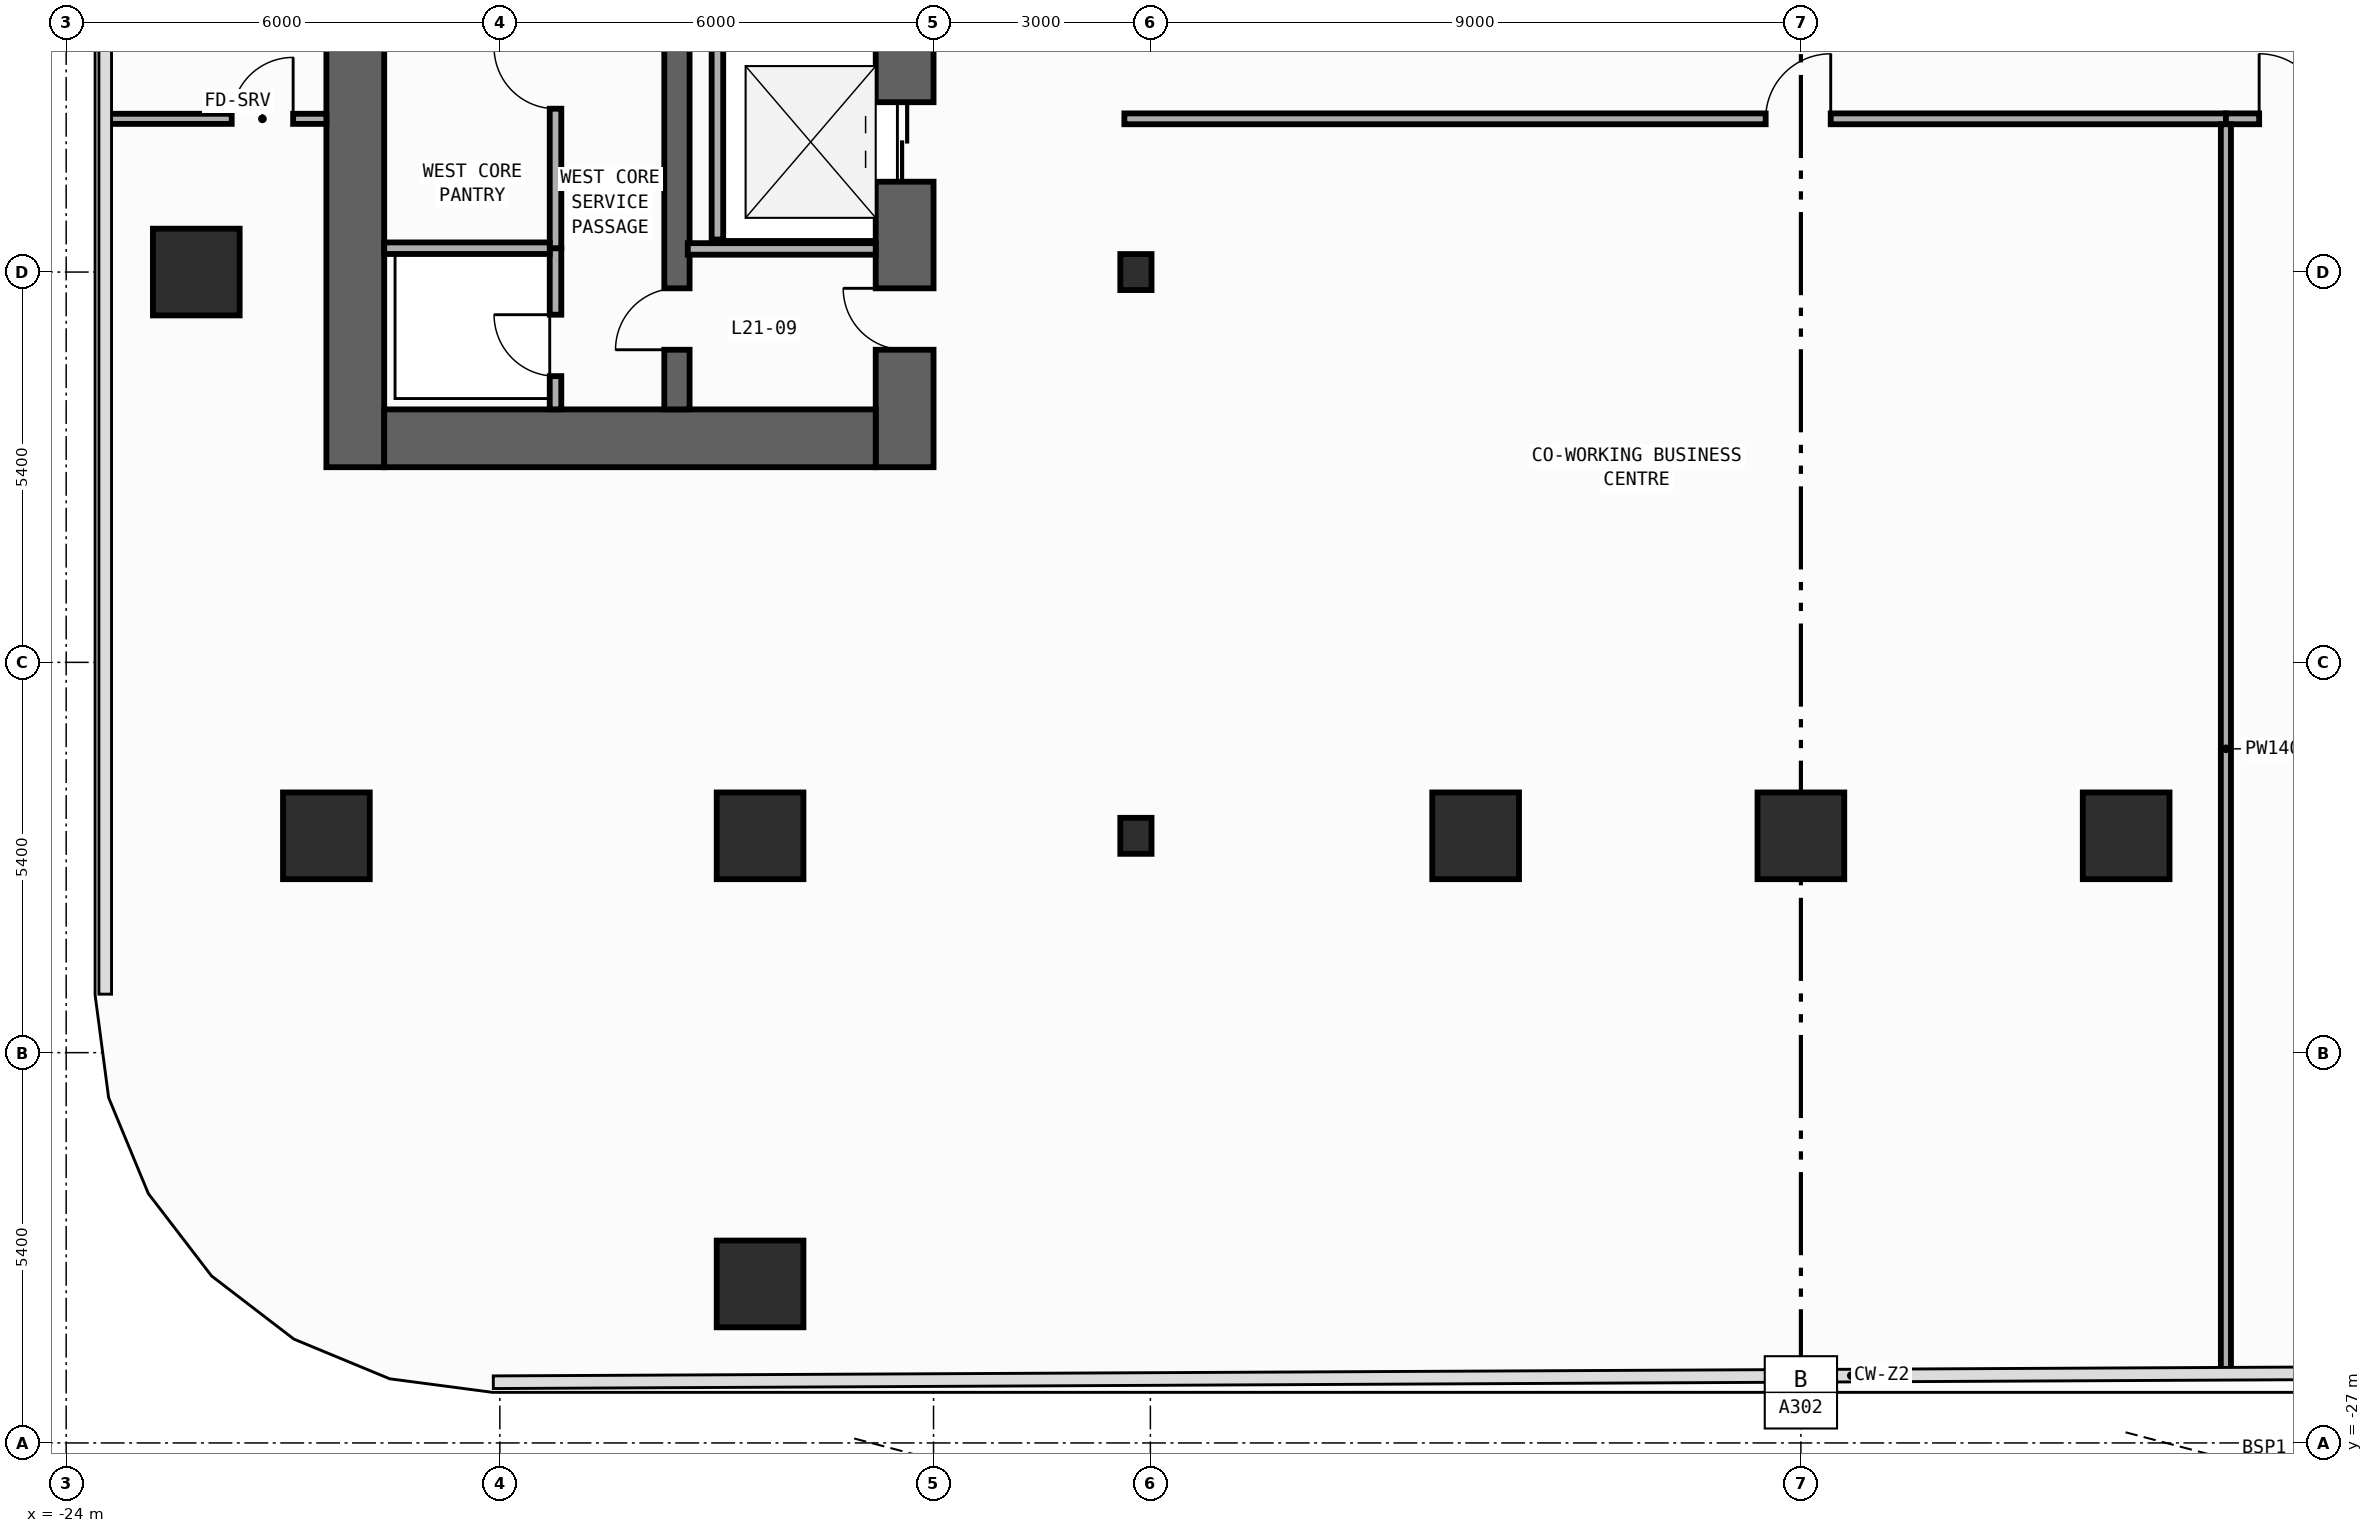
"""IFC4 building model, lengths in metres.
Left out: names, types, materials, properties, quantities, classifications, styles, units other than length and angle.
Written with IfcOpenShell. Run it as: python <this file> out.ifc"""

import sys

from ifc_helpers import new_model, si_unit, direction, frame, frame_2d, origin, origin_2d, place, context, subcontext, project, spatial, rectangle, i_section, extrude, element, fill, save


model = new_model("IFC4")
c1 = context("Model", 3, precision=1e-05, world=origin(), true_north=direction((0.0, 1.0)))
c2 = subcontext(c1, "Body", "Model", "MODEL_VIEW")
j1 = project(units=[si_unit("LENGTHUNIT", "METRE"), si_unit("PLANEANGLEUNIT", "RADIAN")], contexts=[c1])
p1 = place(None, origin())
s1 = spatial("IfcSite", under=j1, at=p1, CompositionType="ELEMENT")
p2 = place(p1, origin())
s2 = spatial("IfcBuilding", under=s1, at=p2, CompositionType="ELEMENT")
p3 = place(p2, frame((0.0, 0.0, 93.2)))
s3 = spatial("IfcBuildingStorey", under=s2, at=p3, CompositionType="ELEMENT", Elevation=93.2)
p4 = place(p3, frame((-20.0, -13.5, 0.0), z_axis=(0.0, 0.0, 1.0), x_axis=(0.0, 1.0, 0.0)))
e1 = element("IfcWall", 1, at=p4, inside=s3, PredefinedType="SHEAR", context=c2, shape_type="SweptSolid", body=[
    extrude(rectangle(XDim=27.0, YDim=0.8, at=frame_2d((13.5, 0.0))), origin(), (0.0, 0.0, 1.0), 3.94),
])
p5 = place(p3, frame((-12.4, -13.5, 0.0), z_axis=(0.0, 0.0, 1.0), x_axis=(0.0, 1.0, 0.0)))
e2 = element("IfcWall", 2, at=p5, inside=s3, PredefinedType="SHEAR", context=c2, shape_type="SweptSolid", body=[
    extrude(rectangle(XDim=27.0, YDim=0.8, at=frame_2d((13.5, 0.0))), origin(), (0.0, 0.0, 1.0), 3.94),
])
p6 = place(p5, frame((21.55, 0.0, 0.0)))
e3 = element("IfcOpeningElement", 3, at=p6, cuts=e2, PredefinedType="OPENING", context=c2, shape_type="SweptSolid", body=[
    extrude(rectangle(XDim=1.1, YDim=2.2, at=frame_2d((0.55, 1.1))), frame((0.0, 0.41, 0.0), z_axis=(0.0, -1.0, 0.0), x_axis=(1.0, 0.0, 0.0)), (0.0, 0.0, 1.0), 0.82),
])
p7 = place(p5, frame((18.35, 0.0, 0.0)))
e4 = element("IfcOpeningElement", 4, at=p7, cuts=e2, PredefinedType="OPENING", context=c2, shape_type="SweptSolid", body=[
    extrude(rectangle(XDim=1.1, YDim=2.2, at=frame_2d((0.55, 1.1))), frame((0.0, 0.41, 0.0), z_axis=(0.0, -1.0, 0.0), x_axis=(1.0, 0.0, 0.0)), (0.0, 0.0, 1.0), 0.82),
])
p8 = place(p5, frame((15.15, 0.0, 0.0)))
e5 = element("IfcOpeningElement", 5, at=p8, cuts=e2, PredefinedType="OPENING", context=c2, shape_type="SweptSolid", body=[
    extrude(rectangle(XDim=1.1, YDim=2.2, at=frame_2d((0.55, 1.1))), frame((0.0, 0.41, 0.0), z_axis=(0.0, -1.0, 0.0), x_axis=(1.0, 0.0, 0.0)), (0.0, 0.0, 1.0), 0.82),
])
p9 = place(p5, frame((10.35, 0.0, 0.0)))
e6 = element("IfcOpeningElement", 6, at=p9, cuts=e2, PredefinedType="OPENING", context=c2, shape_type="SweptSolid", body=[
    extrude(rectangle(XDim=1.1, YDim=2.2, at=frame_2d((0.55, 1.1))), frame((0.0, 0.41, 0.0), z_axis=(0.0, -1.0, 0.0), x_axis=(1.0, 0.0, 0.0)), (0.0, 0.0, 1.0), 0.82),
])
p10 = place(p5, frame((7.15, 0.0, 0.0)))
e7 = element("IfcOpeningElement", 7, at=p10, cuts=e2, PredefinedType="OPENING", context=c2, shape_type="SweptSolid", body=[
    extrude(rectangle(XDim=1.1, YDim=2.2, at=frame_2d((0.55, 1.1))), frame((0.0, 0.41, 0.0), z_axis=(0.0, -1.0, 0.0), x_axis=(1.0, 0.0, 0.0)), (0.0, 0.0, 1.0), 0.82),
])
p11 = place(p5, frame((3.95, 0.0, 0.0)))
e8 = element("IfcOpeningElement", 8, at=p11, cuts=e2, PredefinedType="OPENING", context=c2, shape_type="SweptSolid", body=[
    extrude(rectangle(XDim=1.1, YDim=2.2, at=frame_2d((0.55, 1.1))), frame((0.0, 0.41, 0.0), z_axis=(0.0, -1.0, 0.0), x_axis=(1.0, 0.0, 0.0)), (0.0, 0.0, 1.0), 0.82),
])
p12 = place(p5, frame((12.725, 0.0, 0.0)))
e9 = element("IfcOpeningElement", 9, at=p12, cuts=e2, PredefinedType="OPENING", context=c2, shape_type="SweptSolid", body=[
    extrude(rectangle(XDim=1.15, YDim=2.2, at=frame_2d((0.575, 1.1))), frame((0.0, 0.41, 0.0), z_axis=(0.0, -1.0, 0.0), x_axis=(1.0, 0.0, 0.0)), (0.0, 0.0, 1.0), 0.82),
])
p13 = place(p5, frame((1.625, 0.0, 0.0)))
e10 = element("IfcOpeningElement", 10, at=p13, cuts=e2, PredefinedType="OPENING", context=c2, shape_type="SweptSolid", body=[
    extrude(rectangle(XDim=0.85, YDim=2.1, at=frame_2d((0.425, 1.05))), frame((0.0, 0.41, 0.0), z_axis=(0.0, -1.0, 0.0), x_axis=(1.0, 0.0, 0.0)), (0.0, 0.0, 1.0), 0.82),
])
p14 = place(p3, frame((-19.6, -13.1, 0.0), z_axis=(0.0, 0.0, 1.0), x_axis=(1.0, 0.0, 0.0)))
e11 = element("IfcWall", 11, at=p14, inside=s3, PredefinedType="SHEAR", context=c2, shape_type="SweptSolid", body=[
    extrude(rectangle(XDim=6.8, YDim=0.8, at=frame_2d((3.4, 0.0))), origin(), (0.0, 0.0, 1.0), 3.94),
])
p15 = place(p3, frame((-15.55, -12.7, 0.0), z_axis=(0.0, 0.0, 1.0), x_axis=(0.0, 1.0, 0.0)))
e12 = element("IfcWall", 12, at=p15, inside=s3, PredefinedType="SHEAR", context=c2, shape_type="SweptSolid", body=[
    extrude(rectangle(XDim=25.4, YDim=0.35, at=frame_2d((12.7, 0.0))), origin(), (0.0, 0.0, 1.0), 3.94),
])
p16 = place(p15, frame((11.925, 0.0, 0.0)))
e13 = element("IfcOpeningElement", 13, at=p16, cuts=e12, PredefinedType="OPENING", context=c2, shape_type="SweptSolid", body=[
    extrude(rectangle(XDim=1.15, YDim=2.2, at=frame_2d((0.575, 1.1))), frame((0.0, 0.185, 0.0), z_axis=(0.0, -1.0, 0.0), x_axis=(1.0, 0.0, 0.0)), (0.0, 0.0, 1.0), 0.37),
])
p17 = place(p15, frame((0.825, 0.0, 0.0)))
e14 = element("IfcOpeningElement", 14, at=p17, cuts=e12, PredefinedType="OPENING", context=c2, shape_type="SweptSolid", body=[
    extrude(rectangle(XDim=0.85, YDim=2.1, at=frame_2d((0.425, 1.05))), frame((0.0, 0.185, 0.0), z_axis=(0.0, -1.0, 0.0), x_axis=(1.0, 0.0, 0.0)), (0.0, 0.0, 1.0), 0.37),
])
for number, where, z_axis, x_axis in (
    (15, (-9.2, -18.6, 0.0), (0.0, 0.0, 1.0), (1.0, 0.0, 0.0)),
    (16, (-9.2, -10.8, 0.0), (0.0, 0.0, 1.0), (1.0, 0.0, 0.0)),
):
    element("IfcColumn", number, at=place(p3, frame(where, z_axis=z_axis, x_axis=x_axis)), inside=s3, PredefinedType="COLUMN", context=c2, shape_type="SweptSolid", body=[
        extrude(i_section(OverallWidth=0.432, OverallDepth=0.498, WebThickness=0.045, FlangeThickness=0.07, FilletRadius=0.022, at=origin_2d()), origin(), (0.0, 0.0, 1.0), 4.2),
    ])
for number, where, z_axis, x_axis in (
    (17, (-20.4, -18.6, 0.0), (0.0, 0.0, 1.0), (1.0, 0.0, 0.0)),
    (18, (-14.4, -18.6, 0.0), (0.0, 0.0, 1.0), (1.0, 0.0, 0.0)),
    (19, (-4.5, -18.6, 0.0), (0.0, 0.0, 1.0), (1.0, 0.0, 0.0)),
    (20, (0.0, -18.6, 0.0), (0.0, 0.0, 1.0), (1.0, 0.0, 0.0)),
    (21, (4.5, -18.6, 0.0), (0.0, 0.0, 1.0), (1.0, 0.0, 0.0)),
    (22, (-22.2, -10.8, 0.0), (0.0, 0.0, 1.0), (1.0, 0.0, 0.0)),
    (23, (-14.4, -24.8, 0.0), (0.0, 0.0, 1.0), (1.0, 0.0, 0.0)),
):
    element("IfcColumn", number, at=place(p3, frame(where, z_axis=z_axis, x_axis=x_axis)), inside=s3, PredefinedType="COLUMN", context=c2, shape_type="SweptSolid", body=[
        extrude(rectangle(XDim=1.2, YDim=1.2, at=origin_2d()), origin(), (0.0, 0.0, 1.0), 4.2),
    ])
p18 = place(p3, frame((-14.99, -10.35, 0.0), z_axis=(0.0, 0.0, 1.0), x_axis=(0.0, 1.0, 0.0)))
e24 = element("IfcWall", 24, at=p18, inside=s3, PredefinedType="STANDARD", context=c2, shape_type="SweptSolid", body=[
    extrude(rectangle(XDim=2.7, YDim=0.16, at=frame_2d((1.35, 0.0))), origin(), (0.0, 0.0, 1.0), 3.94),
])
p19 = place(p3, frame((-15.4, -10.48, 0.0), z_axis=(0.0, 0.0, 1.0), x_axis=(1.0, 0.0, 0.0)))
e25 = element("IfcWall", 25, at=p19, inside=s3, PredefinedType="STANDARD", context=c2, shape_type="SweptSolid", body=[
    extrude(rectangle(XDim=2.6, YDim=0.16, at=frame_2d((1.3, 0.0))), origin(), (0.0, 0.0, 1.0), 3.94),
])
p20 = place(p3, frame((-17.23, -12.7, 0.0), z_axis=(0.0, 0.0, 1.0), x_axis=(0.0, 1.0, 0.0)))
e26 = element("IfcWall", 26, at=p20, inside=s3, PredefinedType="PARTITIONING", context=c2, shape_type="SweptSolid", body=[
    extrude(rectangle(XDim=2.23, YDim=0.16, at=frame_2d((1.115, 0.0))), origin(), (0.0, 0.0, 1.0), 3.94),
])
p21 = place(p20, frame((0.46, 0.0, 0.0)))
e27 = element("IfcOpeningElement", 27, at=p21, cuts=e26, PredefinedType="OPENING", context=c2, shape_type="SweptSolid", body=[
    extrude(rectangle(XDim=0.85, YDim=2.1, at=frame_2d((0.425, 1.05))), frame((0.0, 0.09, 0.0), z_axis=(0.0, -1.0, 0.0), x_axis=(1.0, 0.0, 0.0)), (0.0, 0.0, 1.0), 0.18),
])
p22 = place(p3, frame((-17.23, -10.47, 0.0), z_axis=(0.0, 0.0, 1.0), x_axis=(0.0, 1.0, 0.0)))
e28 = element("IfcWall", 28, at=p22, inside=s3, PredefinedType="PARTITIONING", context=c2, shape_type="SweptSolid", body=[
    extrude(rectangle(XDim=3.24, YDim=0.16, at=frame_2d((1.62, 0.0))), origin(), (0.0, 0.0, 1.0), 3.94),
])
p23 = place(p22, frame((1.93, 0.0, 0.0)))
e29 = element("IfcOpeningElement", 29, at=p23, cuts=e28, PredefinedType="OPENING", context=c2, shape_type="SweptSolid", body=[
    extrude(rectangle(XDim=0.85, YDim=2.1, at=frame_2d((0.425, 1.05))), frame((0.0, 0.09, 0.0), z_axis=(0.0, -1.0, 0.0), x_axis=(1.0, 0.0, 0.0)), (0.0, 0.0, 1.0), 0.18),
])
p24 = place(p3, frame((-19.6, -10.47, 0.0), z_axis=(0.0, 0.0, 1.0), x_axis=(1.0, 0.0, 0.0)))
e30 = element("IfcWall", 30, at=p24, inside=s3, PredefinedType="PARTITIONING", context=c2, shape_type="SweptSolid", body=[
    extrude(rectangle(XDim=2.29, YDim=0.16, at=frame_2d((1.145, 0.0))), origin(), (0.0, 0.0, 1.0), 3.94),
])
p25 = place(p3, frame((-9.36, -8.68, 0.0), z_axis=(0.0, 0.0, 1.0), x_axis=(1.0, 0.0, 0.0)))
e31 = element("IfcWall", 31, at=p25, inside=s3, PredefinedType="PARTITIONING", context=c2, shape_type="SweptSolid", body=[
    extrude(rectangle(XDim=15.24, YDim=0.15, at=frame_2d((7.62, 0.0))), origin(), (0.0, 0.0, 1.0), 3.94),
])
p26 = place(p25, frame((8.873, 0.0, 0.0)))
e32 = element("IfcOpeningElement", 32, at=p26, cuts=e31, PredefinedType="OPENING", context=c2, shape_type="SweptSolid", body=[
    extrude(rectangle(XDim=0.9, YDim=2.15, at=frame_2d((0.45, 1.075))), frame((0.0, 0.085, 0.0), z_axis=(0.0, -1.0, 0.0), x_axis=(1.0, 0.0, 0.0)), (0.0, 0.0, 1.0), 0.17),
])
p27 = place(p3, frame((5.88, -8.68, 0.0), z_axis=(0.0, 0.0, 1.0), x_axis=(1.0, 0.0, 0.0)))
e33 = element("IfcWall", 33, at=p27, inside=s3, PredefinedType="PARTITIONING", context=c2, shape_type="SweptSolid", body=[
    extrude(rectangle(XDim=4.31, YDim=0.15, at=frame_2d((2.155, 0.0))), origin(), (0.0, 0.0, 1.0), 3.94),
])
p28 = place(p27, frame((0.46, 0.0, 0.0)))
e34 = element("IfcOpeningElement", 34, at=p28, cuts=e33, PredefinedType="OPENING", context=c2, shape_type="SweptSolid", body=[
    extrude(rectangle(XDim=0.9, YDim=2.15, at=frame_2d((0.45, 1.075))), frame((0.0, 0.085, 0.0), z_axis=(0.0, -1.0, 0.0), x_axis=(1.0, 0.0, 0.0)), (0.0, 0.0, 1.0), 0.17),
])
p29 = place(p3, frame((5.88, -26.038, 0.0), z_axis=(0.0, 0.0, 1.0), x_axis=(0.0, 1.0, 0.0)))
e35 = element("IfcWall", 35, at=p29, inside=s3, PredefinedType="PARTITIONING", context=c2, shape_type="SweptSolid", body=[
    extrude(rectangle(XDim=17.283, YDim=0.14, at=frame_2d((8.642, 0.0))), origin(), (0.0, 0.0, 1.0), 3.94),
])
p30 = place(p3, frame((-23.455, -8.68, 0.0), z_axis=(0.0, 0.0, 1.0), x_axis=(1.0, 0.0, 0.0)))
e36 = element("IfcWall", 36, at=p30, inside=s3, PredefinedType="PARTITIONING", context=c2, shape_type="SweptSolid", body=[
    extrude(rectangle(XDim=3.055, YDim=0.14, at=frame_2d((1.528, 0.0))), origin(), (0.0, 0.0, 1.0), 3.94),
])
p31 = place(p30, frame((1.745, 0.0, 0.0)))
e37 = element("IfcOpeningElement", 37, at=p31, cuts=e36, PredefinedType="OPENING", context=c2, shape_type="SweptSolid", body=[
    extrude(rectangle(XDim=0.85, YDim=2.1, at=frame_2d((0.425, 1.05))), frame((0.0, 0.08, 0.0), z_axis=(0.0, -1.0, 0.0), x_axis=(1.0, 0.0, 0.0)), (0.0, 0.0, 1.0), 0.16),
])
p32 = place(p11, origin())
e38 = element("IfcDoor", 38, at=p32, inside=s3, OperationType="DOUBLE_DOOR_SLIDING", PredefinedType="DOOR", context=c2, shape_type="SweptSolid", body=[
    extrude(rectangle(XDim=1.1, YDim=2.2, at=frame_2d((0.55, 1.1))), frame((0.0, 0.025, 0.0), z_axis=(0.0, -1.0, 0.0), x_axis=(1.0, 0.0, 0.0)), (0.0, 0.0, 1.0), 0.05),
])
fill(e8, e38)
p33 = place(p13, origin())
e39 = element("IfcDoor", 39, at=p33, inside=s3, OperationType="SINGLE_SWING_RIGHT", PredefinedType="DOOR", context=c2, shape_type="SweptSolid", body=[
    extrude(rectangle(XDim=0.85, YDim=2.1, at=frame_2d((0.425, 1.05))), frame((0.0, 0.025, 0.0), z_axis=(0.0, -1.0, 0.0), x_axis=(1.0, 0.0, 0.0)), (0.0, 0.0, 1.0), 0.05),
])
fill(e10, e39)
p34 = place(p17, origin())
e40 = element("IfcDoor", 40, at=p34, inside=s3, OperationType="SINGLE_SWING_LEFT", PredefinedType="DOOR", context=c2, shape_type="SweptSolid", body=[
    extrude(rectangle(XDim=0.85, YDim=2.1, at=frame_2d((0.425, 1.05))), frame((0.0, 0.025, 0.0), z_axis=(0.0, -1.0, 0.0), x_axis=(1.0, 0.0, 0.0)), (0.0, 0.0, 1.0), 0.05),
])
fill(e14, e40)
p35 = place(p21, origin())
e41 = element("IfcDoor", 41, at=p35, inside=s3, OperationType="SINGLE_SWING_RIGHT", PredefinedType="DOOR", context=c2, shape_type="SweptSolid", body=[
    extrude(rectangle(XDim=0.85, YDim=2.1, at=frame_2d((0.425, 1.05))), frame((0.0, 0.025, 0.0), z_axis=(0.0, -1.0, 0.0), x_axis=(1.0, 0.0, 0.0)), (0.0, 0.0, 1.0), 0.05),
])
fill(e27, e41)
p36 = place(p23, origin())
e42 = element("IfcDoor", 42, at=p36, inside=s3, OperationType="SINGLE_SWING_RIGHT", PredefinedType="DOOR", context=c2, shape_type="SweptSolid", body=[
    extrude(rectangle(XDim=0.85, YDim=2.1, at=frame_2d((0.425, 1.05))), frame((0.0, 0.025, 0.0), z_axis=(0.0, -1.0, 0.0), x_axis=(1.0, 0.0, 0.0)), (0.0, 0.0, 1.0), 0.05),
])
fill(e29, e42)
p37 = place(p26, origin())
e43 = element("IfcDoor", 43, at=p37, inside=s3, OperationType="SINGLE_SWING_RIGHT", PredefinedType="DOOR", context=c2, shape_type="SweptSolid", body=[
    extrude(rectangle(XDim=0.9, YDim=2.15, at=frame_2d((0.45, 1.075))), frame((0.0, 0.025, 0.0), z_axis=(0.0, -1.0, 0.0), x_axis=(1.0, 0.0, 0.0)), (0.0, 0.0, 1.0), 0.05),
])
fill(e32, e43)
p38 = place(p28, origin())
e44 = element("IfcDoor", 44, at=p38, inside=s3, OperationType="SINGLE_SWING_LEFT", PredefinedType="DOOR", context=c2, shape_type="SweptSolid", body=[
    extrude(rectangle(XDim=0.9, YDim=2.15, at=frame_2d((0.45, 1.075))), frame((0.0, 0.025, 0.0), z_axis=(0.0, -1.0, 0.0), x_axis=(1.0, 0.0, 0.0)), (0.0, 0.0, 1.0), 0.05),
])
fill(e34, e44)
p39 = place(p31, origin())
e45 = element("IfcDoor", 45, at=p39, inside=s3, OperationType="SINGLE_SWING_RIGHT", PredefinedType="DOOR", context=c2, shape_type="SweptSolid", body=[
    extrude(rectangle(XDim=0.85, YDim=2.1, at=frame_2d((0.425, 1.05))), frame((0.0, 0.025, 0.0), z_axis=(0.0, -1.0, 0.0), x_axis=(1.0, 0.0, 0.0)), (0.0, 0.0, 1.0), 0.05),
])
fill(e37, e45)
save(model, sys.argv[1])
